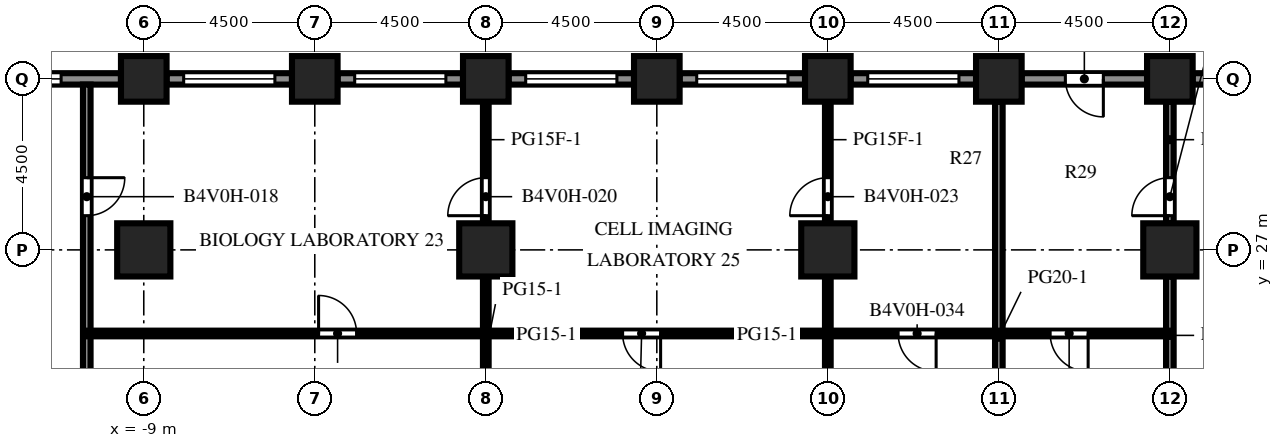
"""IFC4 building model, lengths in metres.
Left out: names, types, materials, properties, quantities, classifications, styles, units other than length and angle.
Written with IfcOpenShell. Run it as: python <this file> out.ifc"""

import sys

from ifc_helpers import new_model, si_unit, direction, frame, frame_2d, origin, origin_2d, place, context, subcontext, project, spatial, rectangle, extrude, element, fill, save


model = new_model("IFC4")
c1 = context("Model", 3, precision=1e-05, world=origin(), true_north=direction((0.0, 1.0)))
c2 = subcontext(c1, "Body", "Model", "MODEL_VIEW")
j1 = project(units=[si_unit("LENGTHUNIT", "METRE"), si_unit("PLANEANGLEUNIT", "RADIAN")], contexts=[c1])
p1 = place(None, origin())
s1 = spatial("IfcSite", under=j1, at=p1, CompositionType="ELEMENT")
p2 = place(p1, origin())
s2 = spatial("IfcBuilding", under=s1, at=p2, CompositionType="ELEMENT")
p3 = place(p2, frame((0.0, 0.0, 116.7)))
s3 = spatial("IfcBuildingStorey", under=s2, at=p3, CompositionType="ELEMENT", Elevation=116.7)
for number, where, z_axis, x_axis in (
    (1, (-9.0, 31.5, 0.0), (0.0, 0.0, 1.0), (1.0, 0.0, 0.0)),
    (2, (-4.5, 31.5, 0.0), (0.0, 0.0, 1.0), (1.0, 0.0, 0.0)),
    (3, (0.0, 31.5, 0.0), (0.0, 0.0, 1.0), (1.0, 0.0, 0.0)),
    (4, (4.5, 31.5, 0.0), (0.0, 0.0, 1.0), (1.0, 0.0, 0.0)),
    (5, (9.0, 31.5, 0.0), (0.0, 0.0, 1.0), (1.0, 0.0, 0.0)),
    (6, (13.5, 31.5, 0.0), (0.0, 0.0, 1.0), (1.0, 0.0, 0.0)),
    (7, (18.0, 31.5, 0.0), (0.0, 0.0, 1.0), (1.0, 0.0, 0.0)),
):
    element("IfcColumn", number, at=place(p3, frame(where, z_axis=z_axis, x_axis=x_axis)), inside=s3, PredefinedType="COLUMN", context=c2, shape_type="SweptSolid", body=[
        extrude(rectangle(XDim=1.2, YDim=1.2, at=origin_2d()), origin(), (0.0, 0.0, 1.0), 4.1),
    ])
p4 = place(p3, frame((-9.0, 27.0, -0.45), z_axis=(0.0, 0.0, 1.0), x_axis=(1.0, 0.0, 0.0)))
e8 = element("IfcColumn", 8, at=p4, inside=s3, PredefinedType="COLUMN", context=c2, shape_type="SweptSolid", body=[
    extrude(rectangle(XDim=1.4, YDim=1.4, at=origin_2d()), origin(), (0.0, 0.0, 1.0), 4.55),
])
for number, where, z_axis, x_axis in (
    (9, (0.0, 27.0, 0.0), (0.0, 0.0, 1.0), (1.0, 0.0, 0.0)),
    (10, (9.0, 27.0, 0.0), (0.0, 0.0, 1.0), (1.0, 0.0, 0.0)),
    (11, (18.0, 27.0, 0.0), (0.0, 0.0, 1.0), (1.0, 0.0, 0.0)),
):
    element("IfcColumn", number, at=place(p3, frame(where, z_axis=z_axis, x_axis=x_axis)), inside=s3, PredefinedType="COLUMN", context=c2, shape_type="SweptSolid", body=[
        extrude(rectangle(XDim=1.4, YDim=1.4, at=origin_2d()), origin(), (0.0, 0.0, 1.0), 4.1),
    ])
p5 = place(p3, frame((18.6, 31.5, 0.0), z_axis=(0.0, 0.0, 1.0), x_axis=(1.0, 0.0, 0.0)))
e12 = element("IfcWall", 12, at=p5, inside=s3, PredefinedType="SOLIDWALL", context=c2, shape_type="SweptSolid", body=[
    extrude(rectangle(XDim=3.3, YDim=0.3, at=frame_2d((1.65, 0.0))), origin(), (0.0, 0.0, 1.0), 2.75),
])
p6 = place(p5, frame((0.525, 0.0, 0.8)))
e13 = element("IfcOpeningElement", 13, at=p6, cuts=e12, PredefinedType="OPENING", context=c2, shape_type="SweptSolid", body=[
    extrude(rectangle(XDim=1.2, YDim=1.7, at=frame_2d((0.6, 0.85))), frame((0.0, 0.16, 0.0), z_axis=(0.0, -1.0, 0.0), x_axis=(1.0, 0.0, 0.0)), (0.0, 0.0, 1.0), 0.32),
])
p7 = place(p3, frame((14.1, 31.5, 0.0), z_axis=(0.0, 0.0, 1.0), x_axis=(1.0, 0.0, 0.0)))
e14 = element("IfcWall", 14, at=p7, inside=s3, PredefinedType="SOLIDWALL", context=c2, shape_type="SweptSolid", body=[
    extrude(rectangle(XDim=3.3, YDim=0.3, at=frame_2d((1.65, 0.0))), origin(), (0.0, 0.0, 1.0), 2.75),
])
p8 = place(p7, frame((1.15, 0.0, 0.0)))
e15 = element("IfcOpeningElement", 15, at=p8, cuts=e14, PredefinedType="OPENING", context=c2, shape_type="SweptSolid", body=[
    extrude(rectangle(XDim=1.0, YDim=2.2, at=frame_2d((0.5, 1.1))), frame((0.0, 0.16, 0.0), z_axis=(0.0, -1.0, 0.0), x_axis=(1.0, 0.0, 0.0)), (0.0, 0.0, 1.0), 0.32),
])
p9 = place(p3, frame((9.6, 31.5, 0.0), z_axis=(0.0, 0.0, 1.0), x_axis=(1.0, 0.0, 0.0)))
e16 = element("IfcWall", 16, at=p9, inside=s3, PredefinedType="SOLIDWALL", context=c2, shape_type="SweptSolid", body=[
    extrude(rectangle(XDim=3.3, YDim=0.3, at=frame_2d((1.65, 0.0))), origin(), (0.0, 0.0, 1.0), 2.75),
])
p10 = place(p9, frame((0.45, 0.0, 0.8)))
e17 = element("IfcOpeningElement", 17, at=p10, cuts=e16, PredefinedType="OPENING", context=c2, shape_type="SweptSolid", body=[
    extrude(rectangle(XDim=2.4, YDim=1.7, at=frame_2d((1.2, 0.85))), frame((0.0, 0.16, 0.0), z_axis=(0.0, -1.0, 0.0), x_axis=(1.0, 0.0, 0.0)), (0.0, 0.0, 1.0), 0.32),
])
p11 = place(p3, frame((5.1, 31.5, 0.0), z_axis=(0.0, 0.0, 1.0), x_axis=(1.0, 0.0, 0.0)))
e18 = element("IfcWall", 18, at=p11, inside=s3, PredefinedType="SOLIDWALL", context=c2, shape_type="SweptSolid", body=[
    extrude(rectangle(XDim=3.3, YDim=0.3, at=frame_2d((1.65, 0.0))), origin(), (0.0, 0.0, 1.0), 2.75),
])
p12 = place(p11, frame((0.45, 0.0, 0.8)))
e19 = element("IfcOpeningElement", 19, at=p12, cuts=e18, PredefinedType="OPENING", context=c2, shape_type="SweptSolid", body=[
    extrude(rectangle(XDim=2.4, YDim=1.7, at=frame_2d((1.2, 0.85))), frame((0.0, 0.16, 0.0), z_axis=(0.0, -1.0, 0.0), x_axis=(1.0, 0.0, 0.0)), (0.0, 0.0, 1.0), 0.32),
])
p13 = place(p3, frame((0.6, 31.5, 0.0), z_axis=(0.0, 0.0, 1.0), x_axis=(1.0, 0.0, 0.0)))
e20 = element("IfcWall", 20, at=p13, inside=s3, PredefinedType="SOLIDWALL", context=c2, shape_type="SweptSolid", body=[
    extrude(rectangle(XDim=3.3, YDim=0.3, at=frame_2d((1.65, 0.0))), origin(), (0.0, 0.0, 1.0), 2.75),
])
p14 = place(p13, frame((0.45, 0.0, 0.8)))
e21 = element("IfcOpeningElement", 21, at=p14, cuts=e20, PredefinedType="OPENING", context=c2, shape_type="SweptSolid", body=[
    extrude(rectangle(XDim=2.4, YDim=1.7, at=frame_2d((1.2, 0.85))), frame((0.0, 0.16, 0.0), z_axis=(0.0, -1.0, 0.0), x_axis=(1.0, 0.0, 0.0)), (0.0, 0.0, 1.0), 0.32),
])
p15 = place(p3, frame((-3.9, 31.5, 0.0), z_axis=(0.0, 0.0, 1.0), x_axis=(1.0, 0.0, 0.0)))
e22 = element("IfcWall", 22, at=p15, inside=s3, PredefinedType="SOLIDWALL", context=c2, shape_type="SweptSolid", body=[
    extrude(rectangle(XDim=3.3, YDim=0.3, at=frame_2d((1.65, 0.0))), origin(), (0.0, 0.0, 1.0), 2.75),
])
p16 = place(p15, frame((0.45, 0.0, 0.8)))
e23 = element("IfcOpeningElement", 23, at=p16, cuts=e22, PredefinedType="OPENING", context=c2, shape_type="SweptSolid", body=[
    extrude(rectangle(XDim=2.4, YDim=1.7, at=frame_2d((1.2, 0.85))), frame((0.0, 0.16, 0.0), z_axis=(0.0, -1.0, 0.0), x_axis=(1.0, 0.0, 0.0)), (0.0, 0.0, 1.0), 0.32),
])
p17 = place(p3, frame((-8.4, 31.5, 0.0), z_axis=(0.0, 0.0, 1.0), x_axis=(1.0, 0.0, 0.0)))
e24 = element("IfcWall", 24, at=p17, inside=s3, PredefinedType="SOLIDWALL", context=c2, shape_type="SweptSolid", body=[
    extrude(rectangle(XDim=3.3, YDim=0.3, at=frame_2d((1.65, 0.0))), origin(), (0.0, 0.0, 1.0), 2.75),
])
p18 = place(p17, frame((0.45, 0.0, 0.8)))
e25 = element("IfcOpeningElement", 25, at=p18, cuts=e24, PredefinedType="OPENING", context=c2, shape_type="SweptSolid", body=[
    extrude(rectangle(XDim=2.4, YDim=1.7, at=frame_2d((1.2, 0.85))), frame((0.0, 0.16, 0.0), z_axis=(0.0, -1.0, 0.0), x_axis=(1.0, 0.0, 0.0)), (0.0, 0.0, 1.0), 0.32),
])
p19 = place(p3, frame((-12.9, 31.5, 0.0), z_axis=(0.0, 0.0, 1.0), x_axis=(1.0, 0.0, 0.0)))
e26 = element("IfcWall", 26, at=p19, inside=s3, PredefinedType="SOLIDWALL", context=c2, shape_type="SweptSolid", body=[
    extrude(rectangle(XDim=3.3, YDim=0.3, at=frame_2d((1.65, 0.0))), origin(), (0.0, 0.0, 1.0), 2.75),
])
p20 = place(p19, frame((0.525, 0.0, 0.8)))
e27 = element("IfcOpeningElement", 27, at=p20, cuts=e26, PredefinedType="OPENING", context=c2, shape_type="SweptSolid", body=[
    extrude(rectangle(XDim=1.2, YDim=1.7, at=frame_2d((0.6, 0.85))), frame((0.0, 0.16, 0.0), z_axis=(0.0, -1.0, 0.0), x_axis=(1.0, 0.0, 0.0)), (0.0, 0.0, 1.0), 0.32),
])
p21 = place(p3, frame((-10.5, 31.35, 0.0), z_axis=(0.0, 0.0, 1.0), x_axis=(0.0, -1.0, 0.0)))
e28 = element("IfcWall", 28, at=p21, inside=s3, PredefinedType="PARTITIONING", context=c2, shape_type="SweptSolid", body=[
    extrude(rectangle(XDim=12.85, YDim=0.2, at=frame_2d((6.425, 0.0))), origin(), (0.0, 0.0, 1.0), 3.65),
])
p22 = place(p21, frame((2.45, 0.0, 0.0)))
e29 = element("IfcOpeningElement", 29, at=p22, cuts=e28, PredefinedType="OPENING", context=c2, shape_type="SweptSolid", body=[
    extrude(rectangle(XDim=1.0, YDim=2.1, at=frame_2d((0.5, 1.05))), frame((0.0, 0.11, 0.0), z_axis=(0.0, -1.0, 0.0), x_axis=(1.0, 0.0, 0.0)), (0.0, 0.0, 1.0), 0.22),
])
p23 = place(p3, frame((0.0, 23.2, 0.0), z_axis=(0.0, 0.0, 1.0), x_axis=(0.0, 1.0, 0.0)))
e30 = element("IfcWall", 30, at=p23, inside=s3, PredefinedType="PARTITIONING", context=c2, shape_type="SweptSolid", body=[
    extrude(rectangle(XDim=3.1, YDim=0.15, at=frame_2d((1.55, 0.0))), origin(), (0.0, 0.0, 1.0), 3.65),
])
p24 = place(p3, frame((0.0, 30.9, 0.0), z_axis=(0.0, 0.0, 1.0), x_axis=(0.0, -1.0, 0.0)))
e31 = element("IfcWall", 31, at=p24, inside=s3, PredefinedType="PARTITIONING", context=c2, shape_type="SweptSolid", body=[
    extrude(rectangle(XDim=3.2, YDim=0.15, at=frame_2d((1.6, 0.0))), origin(), (0.0, 0.0, 1.0), 3.65),
])
p25 = place(p24, frame((2.0, 0.0, 0.0)))
e32 = element("IfcOpeningElement", 32, at=p25, cuts=e31, PredefinedType="OPENING", context=c2, shape_type="SweptSolid", body=[
    extrude(rectangle(XDim=1.0, YDim=2.1, at=frame_2d((0.5, 1.05))), frame((0.0, 0.085, 0.0), z_axis=(0.0, -1.0, 0.0), x_axis=(1.0, 0.0, 0.0)), (0.0, 0.0, 1.0), 0.17),
])
p26 = place(p3, frame((9.0, 23.2, 0.0), z_axis=(0.0, 0.0, 1.0), x_axis=(0.0, 1.0, 0.0)))
e33 = element("IfcWall", 33, at=p26, inside=s3, PredefinedType="PARTITIONING", context=c2, shape_type="SweptSolid", body=[
    extrude(rectangle(XDim=3.1, YDim=0.15, at=frame_2d((1.55, 0.0))), origin(), (0.0, 0.0, 1.0), 3.65),
])
p27 = place(p3, frame((9.0, 30.9, 0.0), z_axis=(0.0, 0.0, 1.0), x_axis=(0.0, -1.0, 0.0)))
e34 = element("IfcWall", 34, at=p27, inside=s3, PredefinedType="PARTITIONING", context=c2, shape_type="SweptSolid", body=[
    extrude(rectangle(XDim=3.2, YDim=0.15, at=frame_2d((1.6, 0.0))), origin(), (0.0, 0.0, 1.0), 3.65),
])
p28 = place(p27, frame((2.0, 0.0, 0.0)))
e35 = element("IfcOpeningElement", 35, at=p28, cuts=e34, PredefinedType="OPENING", context=c2, shape_type="SweptSolid", body=[
    extrude(rectangle(XDim=1.0, YDim=2.1, at=frame_2d((0.5, 1.05))), frame((0.0, 0.085, 0.0), z_axis=(0.0, -1.0, 0.0), x_axis=(1.0, 0.0, 0.0)), (0.0, 0.0, 1.0), 0.17),
])
p29 = place(p3, frame((13.5, 18.5, 0.0), z_axis=(0.0, 0.0, 1.0), x_axis=(0.0, 1.0, 0.0)))
e36 = element("IfcWall", 36, at=p29, inside=s3, PredefinedType="PARTITIONING", context=c2, shape_type="SweptSolid", body=[
    extrude(rectangle(XDim=12.4, YDim=0.2, at=frame_2d((6.2, 0.0))), origin(), (0.0, 0.0, 1.0), 3.65),
])
p30 = place(p3, frame((18.0, 23.2, 0.0), z_axis=(0.0, 0.0, 1.0), x_axis=(0.0, 1.0, 0.0)))
e37 = element("IfcWall", 37, at=p30, inside=s3, PredefinedType="PARTITIONING", context=c2, shape_type="SweptSolid", body=[
    extrude(rectangle(XDim=3.1, YDim=0.2, at=frame_2d((1.55, 0.0))), origin(), (0.0, 0.0, 1.0), 3.65),
])
p31 = place(p3, frame((18.0, 27.7, 0.0), z_axis=(0.0, 0.0, 1.0), x_axis=(0.0, 1.0, 0.0)))
e38 = element("IfcWall", 38, at=p31, inside=s3, PredefinedType="PARTITIONING", context=c2, shape_type="SweptSolid", body=[
    extrude(rectangle(XDim=3.2, YDim=0.2, at=frame_2d((1.6, 0.0))), origin(), (0.0, 0.0, 1.0), 3.65),
])
p32 = place(p31, frame((0.2, 0.0, 0.0)))
e39 = element("IfcOpeningElement", 39, at=p32, cuts=e38, PredefinedType="OPENING", context=c2, shape_type="SweptSolid", body=[
    extrude(rectangle(XDim=1.0, YDim=2.1, at=frame_2d((0.5, 1.05))), frame((0.0, 0.11, 0.0), z_axis=(0.0, -1.0, 0.0), x_axis=(1.0, 0.0, 0.0)), (0.0, 0.0, 1.0), 0.22),
])
p33 = place(p3, frame((18.0, 24.8, 0.0), z_axis=(0.0, 0.0, 1.0), x_axis=(-1.0, 0.0, 0.0)))
e40 = element("IfcWall", 40, at=p33, inside=s3, PredefinedType="PARTITIONING", context=c2, shape_type="SweptSolid", body=[
    extrude(rectangle(XDim=28.5, YDim=0.15, at=frame_2d((14.25, 0.0))), origin(), (0.0, 0.0, 1.0), 3.65),
])
p34 = place(p33, frame((21.4, 0.0, 0.0)))
e41 = element("IfcOpeningElement", 41, at=p34, cuts=e40, PredefinedType="OPENING", context=c2, shape_type="SweptSolid", body=[
    extrude(rectangle(XDim=1.0, YDim=2.1, at=frame_2d((0.5, 1.05))), frame((0.0, 0.085, 0.0), z_axis=(0.0, -1.0, 0.0), x_axis=(1.0, 0.0, 0.0)), (0.0, 0.0, 1.0), 0.17),
])
p35 = place(p33, frame((13.4, 0.0, 0.0)))
e42 = element("IfcOpeningElement", 42, at=p35, cuts=e40, PredefinedType="OPENING", context=c2, shape_type="SweptSolid", body=[
    extrude(rectangle(XDim=1.0, YDim=2.1, at=frame_2d((0.5, 1.05))), frame((0.0, 0.085, 0.0), z_axis=(0.0, -1.0, 0.0), x_axis=(1.0, 0.0, 0.0)), (0.0, 0.0, 1.0), 0.17),
])
p36 = place(p33, frame((6.15, 0.0, 0.0)))
e43 = element("IfcOpeningElement", 43, at=p36, cuts=e40, PredefinedType="OPENING", context=c2, shape_type="SweptSolid", body=[
    extrude(rectangle(XDim=1.0, YDim=2.1, at=frame_2d((0.5, 1.05))), frame((0.0, 0.085, 0.0), z_axis=(0.0, -1.0, 0.0), x_axis=(1.0, 0.0, 0.0)), (0.0, 0.0, 1.0), 0.17),
])
p37 = place(p33, frame((2.15, 0.0, 0.0)))
e44 = element("IfcOpeningElement", 44, at=p37, cuts=e40, PredefinedType="OPENING", context=c2, shape_type="SweptSolid", body=[
    extrude(rectangle(XDim=1.0, YDim=2.1, at=frame_2d((0.5, 1.05))), frame((0.0, 0.085, 0.0), z_axis=(0.0, -1.0, 0.0), x_axis=(1.0, 0.0, 0.0)), (0.0, 0.0, 1.0), 0.17),
])
p38 = place(p8, origin())
e45 = element("IfcDoor", 45, at=p38, inside=s3, OperationType="SINGLE_SWING_RIGHT", PredefinedType="DOOR", context=c2, shape_type="SweptSolid", body=[
    extrude(rectangle(XDim=1.0, YDim=2.2, at=frame_2d((0.5, 1.1))), frame((0.0, 0.025, 0.0), z_axis=(0.0, -1.0, 0.0), x_axis=(1.0, 0.0, 0.0)), (0.0, 0.0, 1.0), 0.05),
])
fill(e15, e45)
p39 = place(p10, origin())
e46 = element("IfcWindow", 46, at=p39, inside=s3, PartitioningType="SINGLE_PANEL", PredefinedType="WINDOW", context=c2, shape_type="SweptSolid", body=[
    extrude(rectangle(XDim=2.4, YDim=1.7, at=frame_2d((1.2, 0.85))), frame((0.0, 0.03, 0.0), z_axis=(0.0, -1.0, 0.0), x_axis=(1.0, 0.0, 0.0)), (0.0, 0.0, 1.0), 0.06),
])
fill(e17, e46)
p40 = place(p12, origin())
e47 = element("IfcWindow", 47, at=p40, inside=s3, PartitioningType="SINGLE_PANEL", PredefinedType="WINDOW", context=c2, shape_type="SweptSolid", body=[
    extrude(rectangle(XDim=2.4, YDim=1.7, at=frame_2d((1.2, 0.85))), frame((0.0, 0.03, 0.0), z_axis=(0.0, -1.0, 0.0), x_axis=(1.0, 0.0, 0.0)), (0.0, 0.0, 1.0), 0.06),
])
fill(e19, e47)
p41 = place(p14, origin())
e48 = element("IfcWindow", 48, at=p41, inside=s3, PartitioningType="SINGLE_PANEL", PredefinedType="WINDOW", context=c2, shape_type="SweptSolid", body=[
    extrude(rectangle(XDim=2.4, YDim=1.7, at=frame_2d((1.2, 0.85))), frame((0.0, 0.03, 0.0), z_axis=(0.0, -1.0, 0.0), x_axis=(1.0, 0.0, 0.0)), (0.0, 0.0, 1.0), 0.06),
])
fill(e21, e48)
p42 = place(p16, origin())
e49 = element("IfcWindow", 49, at=p42, inside=s3, PartitioningType="SINGLE_PANEL", PredefinedType="WINDOW", context=c2, shape_type="SweptSolid", body=[
    extrude(rectangle(XDim=2.4, YDim=1.7, at=frame_2d((1.2, 0.85))), frame((0.0, 0.03, 0.0), z_axis=(0.0, -1.0, 0.0), x_axis=(1.0, 0.0, 0.0)), (0.0, 0.0, 1.0), 0.06),
])
fill(e23, e49)
p43 = place(p18, origin())
e50 = element("IfcWindow", 50, at=p43, inside=s3, PartitioningType="SINGLE_PANEL", PredefinedType="WINDOW", context=c2, shape_type="SweptSolid", body=[
    extrude(rectangle(XDim=2.4, YDim=1.7, at=frame_2d((1.2, 0.85))), frame((0.0, 0.03, 0.0), z_axis=(0.0, -1.0, 0.0), x_axis=(1.0, 0.0, 0.0)), (0.0, 0.0, 1.0), 0.06),
])
fill(e25, e50)
p44 = place(p20, origin())
e51 = element("IfcWindow", 51, at=p44, inside=s3, PartitioningType="SINGLE_PANEL", PredefinedType="WINDOW", context=c2, shape_type="SweptSolid", body=[
    extrude(rectangle(XDim=1.2, YDim=1.7, at=frame_2d((0.6, 0.85))), frame((0.0, 0.03, 0.0), z_axis=(0.0, -1.0, 0.0), x_axis=(1.0, 0.0, 0.0)), (0.0, 0.0, 1.0), 0.06),
])
fill(e27, e51)
p45 = place(p22, origin())
e52 = element("IfcDoor", 52, at=p45, inside=s3, OperationType="SINGLE_SWING_LEFT", PredefinedType="DOOR", context=c2, shape_type="SweptSolid", body=[
    extrude(rectangle(XDim=1.0, YDim=2.1, at=frame_2d((0.5, 1.05))), frame((0.0, 0.025, 0.0), z_axis=(0.0, -1.0, 0.0), x_axis=(1.0, 0.0, 0.0)), (0.0, 0.0, 1.0), 0.05),
])
fill(e29, e52)
p46 = place(p25, origin())
e53 = element("IfcDoor", 53, at=p46, inside=s3, OperationType="SINGLE_SWING_RIGHT", PredefinedType="DOOR", context=c2, shape_type="SweptSolid", body=[
    extrude(rectangle(XDim=1.0, YDim=2.1, at=frame_2d((0.5, 1.05))), frame((0.0, 0.025, 0.0), z_axis=(0.0, -1.0, 0.0), x_axis=(1.0, 0.0, 0.0)), (0.0, 0.0, 1.0), 0.05),
])
fill(e32, e53)
p47 = place(p28, origin())
e54 = element("IfcDoor", 54, at=p47, inside=s3, OperationType="SINGLE_SWING_RIGHT", PredefinedType="DOOR", context=c2, shape_type="SweptSolid", body=[
    extrude(rectangle(XDim=1.0, YDim=2.1, at=frame_2d((0.5, 1.05))), frame((0.0, 0.025, 0.0), z_axis=(0.0, -1.0, 0.0), x_axis=(1.0, 0.0, 0.0)), (0.0, 0.0, 1.0), 0.05),
])
fill(e35, e54)
p48 = place(p32, origin())
e55 = element("IfcDoor", 55, at=p48, inside=s3, OperationType="SINGLE_SWING_LEFT", PredefinedType="DOOR", context=c2, shape_type="SweptSolid", body=[
    extrude(rectangle(XDim=1.0, YDim=2.1, at=frame_2d((0.5, 1.05))), frame((0.0, 0.025, 0.0), z_axis=(0.0, -1.0, 0.0), x_axis=(1.0, 0.0, 0.0)), (0.0, 0.0, 1.0), 0.05),
])
fill(e39, e55)
p49 = place(p34, origin())
e56 = element("IfcDoor", 56, at=p49, inside=s3, OperationType="SINGLE_SWING_RIGHT", PredefinedType="DOOR", context=c2, shape_type="SweptSolid", body=[
    extrude(rectangle(XDim=1.0, YDim=2.1, at=frame_2d((0.5, 1.05))), frame((0.0, 0.025, 0.0), z_axis=(0.0, -1.0, 0.0), x_axis=(1.0, 0.0, 0.0)), (0.0, 0.0, 1.0), 0.05),
])
fill(e41, e56)
p50 = place(p35, origin())
e57 = element("IfcDoor", 57, at=p50, inside=s3, OperationType="SINGLE_SWING_LEFT", PredefinedType="DOOR", context=c2, shape_type="SweptSolid", body=[
    extrude(rectangle(XDim=1.0, YDim=2.1, at=frame_2d((0.5, 1.05))), frame((0.0, 0.025, 0.0), z_axis=(0.0, -1.0, 0.0), x_axis=(1.0, 0.0, 0.0)), (0.0, 0.0, 1.0), 0.05),
])
fill(e42, e57)
p51 = place(p36, origin())
e58 = element("IfcDoor", 58, at=p51, inside=s3, OperationType="SINGLE_SWING_LEFT", PredefinedType="DOOR", context=c2, shape_type="SweptSolid", body=[
    extrude(rectangle(XDim=1.0, YDim=2.1, at=frame_2d((0.5, 1.05))), frame((0.0, 0.025, 0.0), z_axis=(0.0, -1.0, 0.0), x_axis=(1.0, 0.0, 0.0)), (0.0, 0.0, 1.0), 0.05),
])
fill(e43, e58)
p52 = place(p37, origin())
e59 = element("IfcDoor", 59, at=p52, inside=s3, OperationType="SINGLE_SWING_LEFT", PredefinedType="DOOR", context=c2, shape_type="SweptSolid", body=[
    extrude(rectangle(XDim=1.0, YDim=2.1, at=frame_2d((0.5, 1.05))), frame((0.0, 0.025, 0.0), z_axis=(0.0, -1.0, 0.0), x_axis=(1.0, 0.0, 0.0)), (0.0, 0.0, 1.0), 0.05),
])
fill(e44, e59)
save(model, sys.argv[1])
